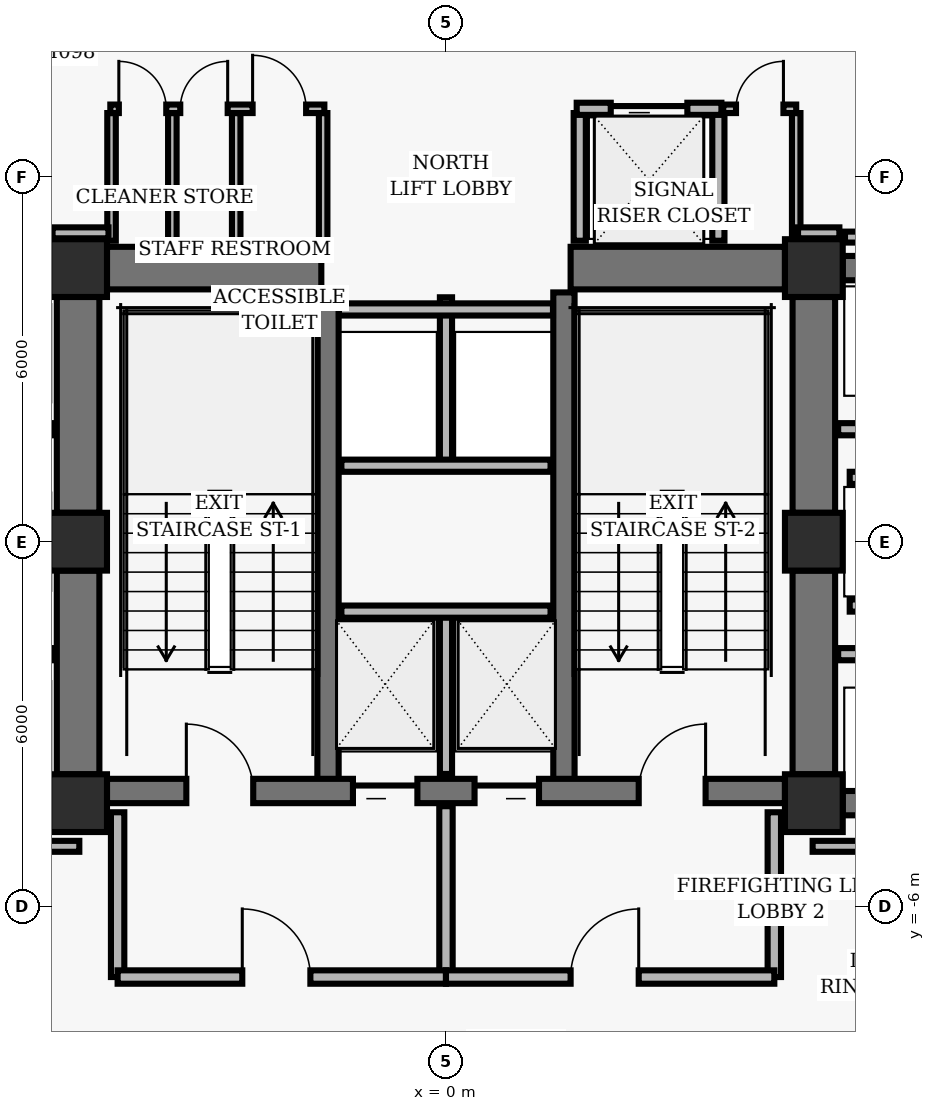
"""IFC4 building model, lengths in metres.
Left out: names, types, materials, properties, quantities, classifications, styles, units other than length and angle.
Written with IfcOpenShell. Run it as: python <this file> out.ifc"""

import sys

from ifc_helpers import new_model, si_unit, direction, frame, frame_2d, origin, origin_2d, place, context, subcontext, project, spatial, rectangle, hollow_rectangle, extrude, element, fill, save


model = new_model("IFC4")
c1 = context("Model", 3, precision=1e-05, world=origin(), true_north=direction((0.0, 1.0)))
c2 = subcontext(c1, "Body", "Model", "MODEL_VIEW")
j1 = project(units=[si_unit("LENGTHUNIT", "METRE"), si_unit("PLANEANGLEUNIT", "RADIAN")], contexts=[c1])
p1 = place(None, origin())
s1 = spatial("IfcSite", under=j1, at=p1, CompositionType="ELEMENT")
p2 = place(p1, origin())
s2 = spatial("IfcBuilding", under=s1, at=p2, CompositionType="ELEMENT")
p3 = place(p2, frame((0.0, 0.0, 73.12)))
s3 = spatial("IfcBuildingStorey", under=s2, at=p3, CompositionType="ELEMENT", Elevation=73.12)
for number, where, z_axis, x_axis in (
    (1, (-6.05, 4.5, 0.0), (0.0, 0.0, 1.0), (1.0, 0.0, 0.0)),
    (2, (6.05, 4.5, 0.0), (0.0, 0.0, 1.0), (1.0, 0.0, 0.0)),
    (3, (-6.05, 0.0, 0.0), (0.0, 0.0, 1.0), (1.0, 0.0, 0.0)),
    (4, (6.05, 0.0, 0.0), (0.0, 0.0, 1.0), (1.0, 0.0, 0.0)),
    (5, (-6.05, -4.3, 0.0), (0.0, 0.0, 1.0), (1.0, 0.0, 0.0)),
    (6, (6.05, -4.3, 0.0), (0.0, 0.0, 1.0), (1.0, 0.0, 0.0)),
):
    element("IfcColumn", number, at=place(p3, frame(where, z_axis=z_axis, x_axis=x_axis)), inside=s3, PredefinedType="COLUMN", context=c2, shape_type="SweptSolid", body=[
        extrude(hollow_rectangle(XDim=0.95, YDim=0.95, WallThickness=0.06, InnerFilletRadius=0.02, OuterFilletRadius=0.04, at=origin_2d()), origin(), (0.0, 0.0, 1.0), 3.36),
    ])
p4 = place(p3, frame((-6.05, 0.475, 0.0), z_axis=(0.0, 0.0, 1.0), x_axis=(0.0, 1.0, 0.0)))
e7 = element("IfcWall", 7, at=p4, inside=s3, PredefinedType="SHEAR", context=c2, shape_type="SweptSolid", body=[
    extrude(rectangle(XDim=3.55, YDim=0.7, at=frame_2d((1.775, 0.0))), origin(), (0.0, 0.0, 1.0), 2.938),
])
p5 = place(p3, frame((-6.05, -3.825, 0.0), z_axis=(0.0, 0.0, 1.0), x_axis=(0.0, 1.0, 0.0)))
e8 = element("IfcWall", 8, at=p5, inside=s3, PredefinedType="SHEAR", context=c2, shape_type="SweptSolid", body=[
    extrude(rectangle(XDim=3.35, YDim=0.7, at=frame_2d((1.675, 0.0))), origin(), (0.0, 0.0, 1.0), 2.938),
])
p6 = place(p3, frame((6.05, 0.475, 0.0), z_axis=(0.0, 0.0, 1.0), x_axis=(0.0, 1.0, 0.0)))
e9 = element("IfcWall", 9, at=p6, inside=s3, PredefinedType="SHEAR", context=c2, shape_type="SweptSolid", body=[
    extrude(rectangle(XDim=3.55, YDim=0.7, at=frame_2d((1.775, 0.0))), origin(), (0.0, 0.0, 1.0), 2.938),
])
p7 = place(p3, frame((6.05, -3.825, 0.0), z_axis=(0.0, 0.0, 1.0), x_axis=(0.0, 1.0, 0.0)))
e10 = element("IfcWall", 10, at=p7, inside=s3, PredefinedType="SHEAR", context=c2, shape_type="SweptSolid", body=[
    extrude(rectangle(XDim=3.35, YDim=0.7, at=frame_2d((1.675, 0.0))), origin(), (0.0, 0.0, 1.0), 2.938),
])
for number, where, z_axis, x_axis in (
    (11, (-1.94, -4.1, 0.0), (0.0, 0.0, 1.0), (0.0, 1.0, 0.0)),
    (12, (1.94, -4.1, 0.0), (0.0, 0.0, 1.0), (0.0, 1.0, 0.0)),
):
    element("IfcWall", number, at=place(p3, frame(where, z_axis=z_axis, x_axis=x_axis)), inside=s3, PredefinedType="SHEAR", context=c2, shape_type="SweptSolid", body=[
        extrude(rectangle(XDim=8.2, YDim=0.35, at=frame_2d((4.1, 0.0))), origin(), (0.0, 0.0, 1.0), 2.938),
    ])
p8 = place(p3, frame((-5.575, -4.1, 0.0), z_axis=(0.0, 0.0, 1.0), x_axis=(1.0, 0.0, 0.0)))
e13 = element("IfcWall", 13, at=p8, inside=s3, PredefinedType="SHEAR", context=c2, shape_type="SweptSolid", body=[
    extrude(rectangle(XDim=11.15, YDim=0.4, at=frame_2d((5.575, 0.0))), origin(), (0.0, 0.0, 1.0), 2.938),
])
p9 = place(p8, frame((1.305, 0.0, 0.0)))
e14 = element("IfcOpeningElement", 14, at=p9, cuts=e13, PredefinedType="OPENING", context=c2, shape_type="SweptSolid", body=[
    extrude(rectangle(XDim=1.1, YDim=2.04, at=frame_2d((0.55, 1.02))), frame((0.0, 0.21, 0.0), z_axis=(0.0, -1.0, 0.0), x_axis=(1.0, 0.0, 0.0)), (0.0, 0.0, 1.0), 0.42),
])
p10 = place(p8, frame((8.745, 0.0, 0.0)))
e15 = element("IfcOpeningElement", 15, at=p10, cuts=e13, PredefinedType="OPENING", context=c2, shape_type="SweptSolid", body=[
    extrude(rectangle(XDim=1.1, YDim=2.04, at=frame_2d((0.55, 1.02))), frame((0.0, 0.21, 0.0), z_axis=(0.0, -1.0, 0.0), x_axis=(1.0, 0.0, 0.0)), (0.0, 0.0, 1.0), 0.42),
])
p11 = place(p8, frame((4.045, 0.0, 0.0)))
e16 = element("IfcOpeningElement", 16, at=p11, cuts=e13, PredefinedType="OPENING", context=c2, shape_type="SweptSolid", body=[
    extrude(rectangle(XDim=1.06, YDim=2.04, at=frame_2d((0.53, 1.02))), frame((0.0, 0.21, 0.0), z_axis=(0.0, -1.0, 0.0), x_axis=(1.0, 0.0, 0.0)), (0.0, 0.0, 1.0), 0.42),
])
p12 = place(p8, frame((6.045, 0.0, 0.0)))
e17 = element("IfcOpeningElement", 17, at=p12, cuts=e13, PredefinedType="OPENING", context=c2, shape_type="SweptSolid", body=[
    extrude(rectangle(XDim=1.06, YDim=2.04, at=frame_2d((0.53, 1.02))), frame((0.0, 0.21, 0.0), z_axis=(0.0, -1.0, 0.0), x_axis=(1.0, 0.0, 0.0)), (0.0, 0.0, 1.0), 0.42),
])
for number, where, z_axis, x_axis in (
    (18, (-5.575, 4.5, 0.0), (0.0, 0.0, 1.0), (1.0, 0.0, 0.0)),
    (19, (2.05, 4.5, 0.0), (0.0, 0.0, 1.0), (1.0, 0.0, 0.0)),
):
    element("IfcWall", number, at=place(p3, frame(where, z_axis=z_axis, x_axis=x_axis)), inside=s3, PredefinedType="SHEAR", context=c2, shape_type="SweptSolid", body=[
        extrude(rectangle(XDim=3.525, YDim=0.7, at=frame_2d((1.762, 0.0))), origin(), (0.0, 0.0, 1.0), 2.938),
    ])
for number, where, z_axis, x_axis in (
    (20, (6.525, 4.5, 0.0), (0.0, 0.0, 1.0), (1.0, 0.0, 0.0)),
    (21, (6.525, -4.3, 0.0), (0.0, 0.0, 1.0), (1.0, 0.0, 0.0)),
):
    element("IfcWall", number, at=place(p3, frame(where, z_axis=z_axis, x_axis=x_axis)), inside=s3, PredefinedType="SHEAR", context=c2, shape_type="SweptSolid", body=[
        extrude(rectangle(XDim=1.95, YDim=0.4, at=frame_2d((0.975, 0.0))), origin(), (0.0, 0.0, 1.0), 2.938),
    ])
p13 = place(p3, frame((0.0, -3.82, 0.0), z_axis=(0.0, 0.0, 1.0), x_axis=(0.0, 1.0, 0.0)))
e22 = element("IfcWall", 22, at=p13, inside=s3, PredefinedType="PARTITIONING", context=c2, shape_type="SweptSolid", body=[
    extrude(rectangle(XDim=2.67, YDim=0.2, at=frame_2d((1.335, 0.0))), origin(), (0.0, 0.0, 1.0), 2.913),
])
p14 = place(p3, frame((-1.72, -1.15, 0.0), z_axis=(0.0, 0.0, 1.0), x_axis=(1.0, 0.0, 0.0)))
e23 = element("IfcWall", 23, at=p14, inside=s3, PredefinedType="PARTITIONING", context=c2, shape_type="SweptSolid", body=[
    extrude(rectangle(XDim=3.44, YDim=0.2, at=frame_2d((1.72, 0.0))), origin(), (0.0, 0.0, 1.0), 2.913),
])
for number, where, z_axis, x_axis in (
    (24, (-5.4, -7.16, 0.0), (0.0, 0.0, 1.0), (0.0, 1.0, 0.0)),
    (25, (5.4, -7.16, 0.0), (0.0, 0.0, 1.0), (0.0, 1.0, 0.0)),
):
    element("IfcWall", number, at=place(p3, frame(where, z_axis=z_axis, x_axis=x_axis)), inside=s3, PredefinedType="PARTITIONING", context=c2, shape_type="SweptSolid", body=[
        extrude(rectangle(XDim=2.71, YDim=0.22, at=frame_2d((1.355, 0.0))), origin(), (0.0, 0.0, 1.0), 2.913),
    ])
p15 = place(p3, frame((0.0, -7.16, 0.0), z_axis=(0.0, 0.0, 1.0), x_axis=(0.0, 1.0, 0.0)))
e26 = element("IfcWall", 26, at=p15, inside=s3, PredefinedType="PARTITIONING", context=c2, shape_type="SweptSolid", body=[
    extrude(rectangle(XDim=2.81, YDim=0.22, at=frame_2d((1.405, 0.0))), origin(), (0.0, 0.0, 1.0), 2.913),
])
p16 = place(p3, frame((-5.4, -7.16, 0.0), z_axis=(0.0, 0.0, 1.0), x_axis=(1.0, 0.0, 0.0)))
e27 = element("IfcWall", 27, at=p16, inside=s3, PredefinedType="PARTITIONING", context=c2, shape_type="SweptSolid", body=[
    extrude(rectangle(XDim=5.4, YDim=0.22, at=frame_2d((2.7, 0.0))), origin(), (0.0, 0.0, 1.0), 2.427),
])
p17 = place(p16, frame((2.05, 0.0, 0.0)))
e28 = element("IfcOpeningElement", 28, at=p17, cuts=e27, PredefinedType="OPENING", context=c2, shape_type="SweptSolid", body=[
    extrude(rectangle(XDim=1.12, YDim=2.02, at=frame_2d((0.56, 1.01))), frame((0.0, 0.12, 0.0), z_axis=(0.0, -1.0, 0.0), x_axis=(1.0, 0.0, 0.0)), (0.0, 0.0, 1.0), 0.24),
])
p18 = place(p3, frame((0.0, -7.16, 0.0), z_axis=(0.0, 0.0, 1.0), x_axis=(1.0, 0.0, 0.0)))
e29 = element("IfcWall", 29, at=p18, inside=s3, PredefinedType="PARTITIONING", context=c2, shape_type="SweptSolid", body=[
    extrude(rectangle(XDim=5.4, YDim=0.22, at=frame_2d((2.7, 0.0))), origin(), (0.0, 0.0, 1.0), 2.427),
])
p19 = place(p18, frame((2.05, 0.0, 0.0)))
e30 = element("IfcOpeningElement", 30, at=p19, cuts=e29, PredefinedType="OPENING", context=c2, shape_type="SweptSolid", body=[
    extrude(rectangle(XDim=1.12, YDim=2.02, at=frame_2d((0.56, 1.01))), frame((0.0, 0.12, 0.0), z_axis=(0.0, -1.0, 0.0), x_axis=(1.0, 0.0, 0.0)), (0.0, 0.0, 1.0), 0.24),
])
p20 = place(p3, frame((0.0, 1.25, 0.0), z_axis=(0.0, 0.0, 1.0), x_axis=(0.0, 1.0, 0.0)))
e31 = element("IfcWall", 31, at=p20, inside=s3, PredefinedType="PARTITIONING", context=c2, shape_type="SweptSolid", body=[
    extrude(rectangle(XDim=2.77, YDim=0.2, at=frame_2d((1.385, 0.0))), origin(), (0.0, 0.0, 1.0), 2.913),
])
p21 = place(p3, frame((-1.72, 1.25, 0.0), z_axis=(0.0, 0.0, 1.0), x_axis=(1.0, 0.0, 0.0)))
e32 = element("IfcWall", 32, at=p21, inside=s3, PredefinedType="PARTITIONING", context=c2, shape_type="SweptSolid", body=[
    extrude(rectangle(XDim=3.44, YDim=0.2, at=frame_2d((1.72, 0.0))), origin(), (0.0, 0.0, 1.0), 2.913),
])
p22 = place(p3, frame((-1.76, 3.82, 0.0), z_axis=(0.0, 0.0, 1.0), x_axis=(1.0, 0.0, 0.0)))
e33 = element("IfcWall", 33, at=p22, inside=s3, PredefinedType="PARTITIONING", context=c2, shape_type="SweptSolid", body=[
    extrude(rectangle(XDim=3.52, YDim=0.2, at=frame_2d((1.76, 0.0))), origin(), (0.0, 0.0, 1.0), 2.913),
])
for number, where, z_axis, x_axis in (
    (34, (2.2, 4.95, 0.0), (0.0, 0.0, 1.0), (0.0, 1.0, 0.0)),
    (35, (4.48, 4.95, 0.0), (0.0, 0.0, 1.0), (0.0, 1.0, 0.0)),
):
    element("IfcWall", number, at=place(p3, frame(where, z_axis=z_axis, x_axis=x_axis)), inside=s3, PredefinedType="PARTITIONING", context=c2, shape_type="SweptSolid", body=[
        extrude(rectangle(XDim=2.1, YDim=0.2, at=frame_2d((1.05, 0.0))), origin(), (0.0, 0.0, 1.0), 2.913),
    ])
p23 = place(p3, frame((2.15, 7.12, 0.0), z_axis=(0.0, 0.0, 1.0), x_axis=(1.0, 0.0, 0.0)))
e36 = element("IfcWall", 36, at=p23, inside=s3, PredefinedType="PARTITIONING", context=c2, shape_type="SweptSolid", body=[
    extrude(rectangle(XDim=2.38, YDim=0.2, at=frame_2d((1.19, 0.0))), origin(), (0.0, 0.0, 1.0), 2.427),
])
p24 = place(p23, frame((0.56, 0.0, 0.0)))
e37 = element("IfcOpeningElement", 37, at=p24, cuts=e36, PredefinedType="OPENING", context=c2, shape_type="SweptSolid", body=[
    extrude(rectangle(XDim=1.26, YDim=2.06, at=frame_2d((0.63, 1.03))), frame((0.0, 0.11, 0.0), z_axis=(0.0, -1.0, 0.0), x_axis=(1.0, 0.0, 0.0)), (0.0, 0.0, 1.0), 0.22),
])
for number, where, z_axis, x_axis in (
    (38, (-5.5, 4.95, 0.0), (0.0, 0.0, 1.0), (0.0, 1.0, 0.0)),
    (39, (-4.5, 4.95, 0.0), (0.0, 0.0, 1.0), (0.0, 1.0, 0.0)),
    (40, (-3.45, 4.95, 0.0), (0.0, 0.0, 1.0), (0.0, 1.0, 0.0)),
    (41, (-2.02, 4.95, 0.0), (0.0, 0.0, 1.0), (0.0, 1.0, 0.0)),
):
    element("IfcWall", number, at=place(p3, frame(where, z_axis=z_axis, x_axis=x_axis)), inside=s3, PredefinedType="PARTITIONING", context=c2, shape_type="SweptSolid", body=[
        extrude(rectangle(XDim=2.1, YDim=0.14, at=frame_2d((1.05, 0.0))), origin(), (0.0, 0.0, 1.0), 2.913),
    ])
p25 = place(p3, frame((-5.52, 7.12, 0.0), z_axis=(0.0, 0.0, 1.0), x_axis=(1.0, 0.0, 0.0)))
e42 = element("IfcWall", 42, at=p25, inside=s3, PredefinedType="PARTITIONING", context=c2, shape_type="SweptSolid", body=[
    extrude(rectangle(XDim=3.52, YDim=0.14, at=frame_2d((1.76, 0.0))), origin(), (0.0, 0.0, 1.0), 2.913),
])
p26 = place(p25, frame((0.14, 0.0, 0.0)))
e43 = element("IfcOpeningElement", 43, at=p26, cuts=e42, PredefinedType="OPENING", context=c2, shape_type="SweptSolid", body=[
    extrude(rectangle(XDim=0.78, YDim=2.01, at=frame_2d((0.39, 1.005))), frame((0.0, 0.08, 0.0), z_axis=(0.0, -1.0, 0.0), x_axis=(1.0, 0.0, 0.0)), (0.0, 0.0, 1.0), 0.16),
])
p27 = place(p25, frame((1.15, 0.0, 0.0)))
e44 = element("IfcOpeningElement", 44, at=p27, cuts=e42, PredefinedType="OPENING", context=c2, shape_type="SweptSolid", body=[
    extrude(rectangle(XDim=0.78, YDim=2.01, at=frame_2d((0.39, 1.005))), frame((0.0, 0.08, 0.0), z_axis=(0.0, -1.0, 0.0), x_axis=(1.0, 0.0, 0.0)), (0.0, 0.0, 1.0), 0.16),
])
p28 = place(p25, frame((2.34, 0.0, 0.0)))
e45 = element("IfcOpeningElement", 45, at=p28, cuts=e42, PredefinedType="OPENING", context=c2, shape_type="SweptSolid", body=[
    extrude(rectangle(XDim=0.88, YDim=2.02, at=frame_2d((0.44, 1.01))), frame((0.0, 0.08, 0.0), z_axis=(0.0, -1.0, 0.0), x_axis=(1.0, 0.0, 0.0)), (0.0, 0.0, 1.0), 0.16),
])
p29 = place(p3, frame((5.76, 4.95, 0.0), z_axis=(0.0, 0.0, 1.0), x_axis=(0.0, 1.0, 0.0)))
e46 = element("IfcWall", 46, at=p29, inside=s3, PredefinedType="PARTITIONING", context=c2, shape_type="SweptSolid", body=[
    extrude(rectangle(XDim=2.1, YDim=0.14, at=frame_2d((1.05, 0.0))), origin(), (0.0, 0.0, 1.0), 2.913),
])
p30 = place(p3, frame((4.56, 7.12, 0.0), z_axis=(0.0, 0.0, 1.0), x_axis=(1.0, 0.0, 0.0)))
e47 = element("IfcWall", 47, at=p30, inside=s3, PredefinedType="PARTITIONING", context=c2, shape_type="SweptSolid", body=[
    extrude(rectangle(XDim=1.2, YDim=0.14, at=frame_2d((0.6, 0.0))), origin(), (0.0, 0.0, 1.0), 2.427),
])
p31 = place(p30, frame((0.21, 0.0, 0.0)))
e48 = element("IfcOpeningElement", 48, at=p31, cuts=e47, PredefinedType="OPENING", context=c2, shape_type="SweptSolid", body=[
    extrude(rectangle(XDim=0.78, YDim=2.01, at=frame_2d((0.39, 1.005))), frame((0.0, 0.08, 0.0), z_axis=(0.0, -1.0, 0.0), x_axis=(1.0, 0.0, 0.0)), (0.0, 0.0, 1.0), 0.16),
])
for number, where, z_axis, x_axis in (
    (49, (-8.55, -1.85, 0.0), (0.0, 0.0, 1.0), (1.0, 0.0, 0.0)),
    (50, (-8.55, 1.85, 0.0), (0.0, 0.0, 1.0), (1.0, 0.0, 0.0)),
    (51, (6.45, -1.85, 0.0), (0.0, 0.0, 1.0), (1.0, 0.0, 0.0)),
    (52, (6.45, 1.85, 0.0), (0.0, 0.0, 1.0), (1.0, 0.0, 0.0)),
):
    element("IfcWall", number, at=place(p3, frame(where, z_axis=z_axis, x_axis=x_axis)), inside=s3, PredefinedType="PARTITIONING", context=c2, shape_type="SweptSolid", body=[
        extrude(rectangle(XDim=2.1, YDim=0.2, at=frame_2d((1.05, 0.0))), origin(), (0.0, 0.0, 1.0), 2.913),
    ])
for number, where, z_axis, x_axis in (
    (53, (6.64, -1.05, 0.0), (0.0, 0.0, 1.0), (1.0, 0.0, 0.0)),
    (54, (6.64, 1.05, 0.0), (0.0, 0.0, 1.0), (1.0, 0.0, 0.0)),
):
    element("IfcWall", number, at=place(p3, frame(where, z_axis=z_axis, x_axis=x_axis)), inside=s3, PredefinedType="PARTITIONING", context=c2, shape_type="SweptSolid", body=[
        extrude(rectangle(XDim=1.91, YDim=0.2, at=frame_2d((0.955, 0.0))), origin(), (0.0, 0.0, 1.0), 2.913),
    ])
for number, where, z_axis, x_axis in (
    (55, (-9.37, -5.01, 0.0), (0.0, 0.0, 1.0), (1.0, 0.0, 0.0)),
    (56, (6.03, -5.01, 0.0), (0.0, 0.0, 1.0), (1.0, 0.0, 0.0)),
):
    element("IfcWall", number, at=place(p3, frame(where, z_axis=z_axis, x_axis=x_axis)), inside=s3, PredefinedType="PARTITIONING", context=c2, shape_type="SweptSolid", body=[
        extrude(rectangle(XDim=3.34, YDim=0.18, at=frame_2d((1.67, 0.0))), origin(), (0.0, 0.0, 1.0), 2.913),
    ])
p32 = place(p3, frame((9.37, 5.01, 0.0), z_axis=(0.0, 0.0, 1.0), x_axis=(-1.0, 0.0, 0.0)))
e57 = element("IfcWall", 57, at=p32, inside=s3, PredefinedType="PARTITIONING", context=c2, shape_type="SweptSolid", body=[
    extrude(rectangle(XDim=2.808, YDim=0.18, at=frame_2d((1.404, 0.0))), origin(), (0.0, 0.0, 1.0), 2.913),
])
p33 = place(p3, frame((6.47, 5.08, 0.0), z_axis=(0.0, 0.0, 1.0), x_axis=(-1.0, 0.0, 0.0)))
e58 = element("IfcWall", 58, at=p33, inside=s3, PredefinedType="PARTITIONING", context=c2, shape_type="SweptSolid", body=[
    extrude(rectangle(XDim=0.68, YDim=0.18, at=frame_2d((0.34, 0.0))), origin(), (0.0, 0.0, 1.0), 2.913),
])
p34 = place(p3, frame((-5.55, 5.08, 0.0), z_axis=(0.0, 0.0, 1.0), x_axis=(-1.0, 0.0, 0.0)))
e59 = element("IfcWall", 59, at=p34, inside=s3, PredefinedType="PARTITIONING", context=c2, shape_type="SweptSolid", body=[
    extrude(rectangle(XDim=0.92, YDim=0.18, at=frame_2d((0.46, 0.0))), origin(), (0.0, 0.0, 1.0), 2.913),
])
p35 = place(p9, origin())
e60 = element("IfcDoor", 60, at=p35, inside=s3, OperationType="SINGLE_SWING_LEFT", PredefinedType="DOOR", context=c2, shape_type="SweptSolid", body=[
    extrude(rectangle(XDim=1.1, YDim=2.04, at=frame_2d((0.55, 1.02))), frame((0.0, 0.025, 0.0), z_axis=(0.0, -1.0, 0.0), x_axis=(1.0, 0.0, 0.0)), (0.0, 0.0, 1.0), 0.05),
])
fill(e14, e60)
p36 = place(p10, origin())
e61 = element("IfcDoor", 61, at=p36, inside=s3, OperationType="SINGLE_SWING_RIGHT", PredefinedType="DOOR", context=c2, shape_type="SweptSolid", body=[
    extrude(rectangle(XDim=1.1, YDim=2.04, at=frame_2d((0.55, 1.02))), frame((0.0, 0.025, 0.0), z_axis=(0.0, -1.0, 0.0), x_axis=(1.0, 0.0, 0.0)), (0.0, 0.0, 1.0), 0.05),
])
fill(e15, e61)
p37 = place(p11, origin())
e62 = element("IfcDoor", 62, at=p37, inside=s3, OperationType="SLIDING_TO_LEFT", PredefinedType="DOOR", context=c2, shape_type="SweptSolid", body=[
    extrude(rectangle(XDim=1.06, YDim=2.04, at=frame_2d((0.53, 1.02))), frame((0.0, 0.025, 0.0), z_axis=(0.0, -1.0, 0.0), x_axis=(1.0, 0.0, 0.0)), (0.0, 0.0, 1.0), 0.05),
])
fill(e16, e62)
p38 = place(p12, origin())
e63 = element("IfcDoor", 63, at=p38, inside=s3, OperationType="SLIDING_TO_RIGHT", PredefinedType="DOOR", context=c2, shape_type="SweptSolid", body=[
    extrude(rectangle(XDim=1.06, YDim=2.04, at=frame_2d((0.53, 1.02))), frame((0.0, 0.025, 0.0), z_axis=(0.0, -1.0, 0.0), x_axis=(1.0, 0.0, 0.0)), (0.0, 0.0, 1.0), 0.05),
])
fill(e17, e63)
p39 = place(p17, origin())
e64 = element("IfcDoor", 64, at=p39, inside=s3, OperationType="SINGLE_SWING_LEFT", PredefinedType="DOOR", context=c2, shape_type="SweptSolid", body=[
    extrude(rectangle(XDim=1.12, YDim=2.02, at=frame_2d((0.56, 1.01))), frame((0.0, 0.025, 0.0), z_axis=(0.0, -1.0, 0.0), x_axis=(1.0, 0.0, 0.0)), (0.0, 0.0, 1.0), 0.05),
])
fill(e28, e64)
p40 = place(p19, origin())
e65 = element("IfcDoor", 65, at=p40, inside=s3, OperationType="SINGLE_SWING_RIGHT", PredefinedType="DOOR", context=c2, shape_type="SweptSolid", body=[
    extrude(rectangle(XDim=1.12, YDim=2.02, at=frame_2d((0.56, 1.01))), frame((0.0, 0.025, 0.0), z_axis=(0.0, -1.0, 0.0), x_axis=(1.0, 0.0, 0.0)), (0.0, 0.0, 1.0), 0.05),
])
fill(e30, e65)
p41 = place(p24, origin())
e66 = element("IfcDoor", 66, at=p41, inside=s3, OperationType="SLIDING_TO_LEFT", PredefinedType="DOOR", context=c2, shape_type="SweptSolid", body=[
    extrude(rectangle(XDim=1.26, YDim=2.06, at=frame_2d((0.63, 1.03))), frame((0.0, 0.025, 0.0), z_axis=(0.0, -1.0, 0.0), x_axis=(1.0, 0.0, 0.0)), (0.0, 0.0, 1.0), 0.05),
])
fill(e37, e66)
p42 = place(p26, origin())
e67 = element("IfcDoor", 67, at=p42, inside=s3, OperationType="SINGLE_SWING_LEFT", PredefinedType="DOOR", context=c2, shape_type="SweptSolid", body=[
    extrude(rectangle(XDim=0.78, YDim=2.01, at=frame_2d((0.39, 1.005))), frame((0.0, 0.025, 0.0), z_axis=(0.0, -1.0, 0.0), x_axis=(1.0, 0.0, 0.0)), (0.0, 0.0, 1.0), 0.05),
])
fill(e43, e67)
p43 = place(p27, origin())
e68 = element("IfcDoor", 68, at=p43, inside=s3, OperationType="SINGLE_SWING_RIGHT", PredefinedType="DOOR", context=c2, shape_type="SweptSolid", body=[
    extrude(rectangle(XDim=0.78, YDim=2.01, at=frame_2d((0.39, 1.005))), frame((0.0, 0.025, 0.0), z_axis=(0.0, -1.0, 0.0), x_axis=(1.0, 0.0, 0.0)), (0.0, 0.0, 1.0), 0.05),
])
fill(e44, e68)
p44 = place(p28, origin())
e69 = element("IfcDoor", 69, at=p44, inside=s3, OperationType="SINGLE_SWING_LEFT", PredefinedType="DOOR", context=c2, shape_type="SweptSolid", body=[
    extrude(rectangle(XDim=0.88, YDim=2.02, at=frame_2d((0.44, 1.01))), frame((0.0, 0.025, 0.0), z_axis=(0.0, -1.0, 0.0), x_axis=(1.0, 0.0, 0.0)), (0.0, 0.0, 1.0), 0.05),
])
fill(e45, e69)
p45 = place(p31, origin())
e70 = element("IfcDoor", 70, at=p45, inside=s3, OperationType="SINGLE_SWING_RIGHT", PredefinedType="DOOR", context=c2, shape_type="SweptSolid", body=[
    extrude(rectangle(XDim=0.78, YDim=2.01, at=frame_2d((0.39, 1.005))), frame((0.0, 0.025, 0.0), z_axis=(0.0, -1.0, 0.0), x_axis=(1.0, 0.0, 0.0)), (0.0, 0.0, 1.0), 0.05),
])
fill(e48, e70)
save(model, sys.argv[1])
